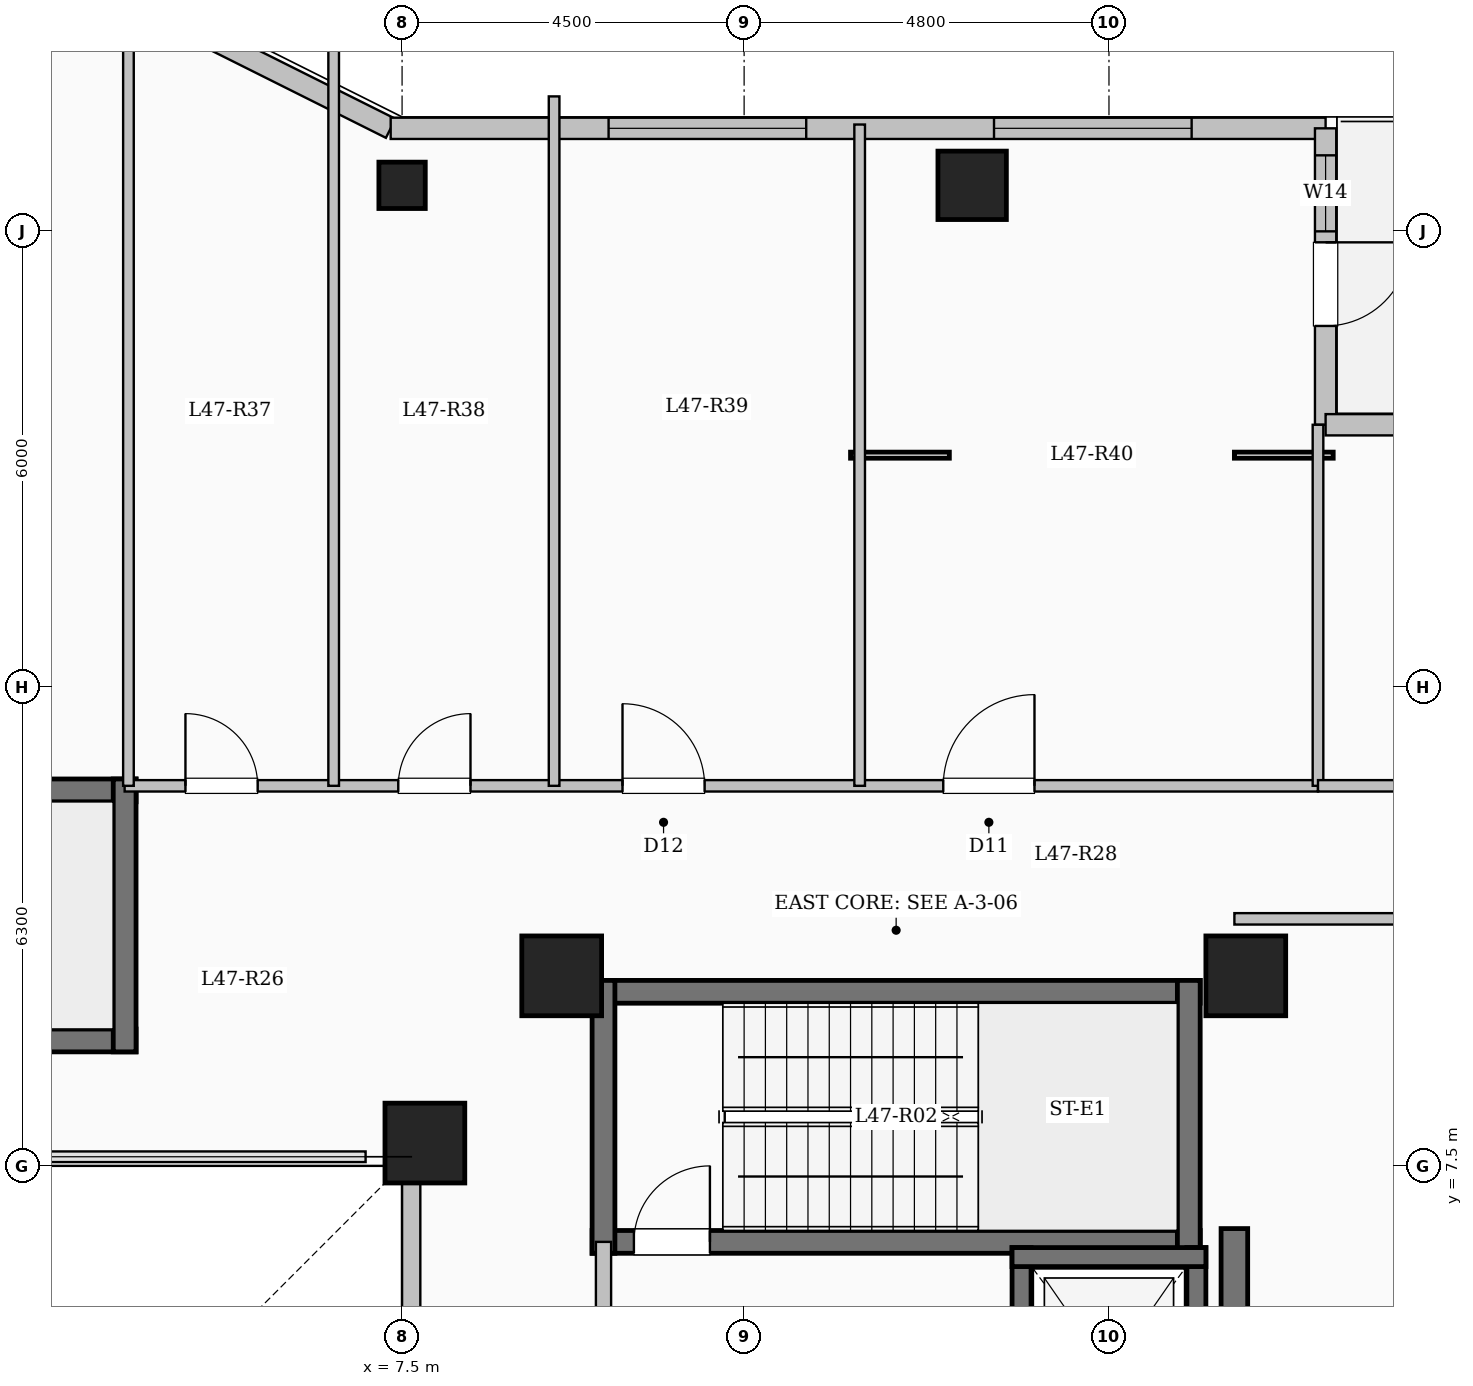
"""IFC4 building model, lengths in metres.
Left out: names, types, materials, properties, quantities, classifications, styles, units other than length and angle.
Written with IfcOpenShell. Run it as: python <this file> out.ifc"""

import sys

from ifc_helpers import new_model, si_unit, direction, frame, frame_2d, origin, origin_2d, place, context, subcontext, project, spatial, rectangle, hollow_circle, extrude, element, fill, save


model = new_model("IFC4")
c1 = context("Model", 3, precision=1e-05, world=origin(), true_north=direction((0.0, 1.0)))
c2 = subcontext(c1, "Body", "Model", "MODEL_VIEW")
j1 = project(units=[si_unit("LENGTHUNIT", "METRE"), si_unit("PLANEANGLEUNIT", "RADIAN")], contexts=[c1])
p1 = place(None, origin())
s1 = spatial("IfcSite", under=j1, at=p1, CompositionType="ELEMENT")
p2 = place(p1, origin())
s2 = spatial("IfcBuilding", under=s1, at=p2, CompositionType="ELEMENT")
p3 = place(p2, frame((0.0, 0.0, 172.8)))
s3 = spatial("IfcBuildingStorey", under=s2, at=p3, CompositionType="ELEMENT", Elevation=172.8)
for number, where, z_axis, x_axis in (
    (1, (7.8, 7.8, 0.0), (0.0, 0.0, 1.0), (1.0, 0.0, 0.0)),
    (2, (9.6, 10.0, 0.0), (0.0, 0.0, 1.0), (1.0, 0.0, 0.0)),
    (3, (18.6, 10.0, 0.0), (0.0, 0.0, 1.0), (1.0, 0.0, 0.0)),
):
    element("IfcColumn", number, at=place(p3, frame(where, z_axis=z_axis, x_axis=x_axis)), inside=s3, PredefinedType="COLUMN", context=c2, shape_type="SweptSolid", body=[
        extrude(rectangle(XDim=1.05, YDim=1.05, at=origin_2d()), origin(), (0.0, 0.0, 1.0), 4.5),
    ])
p4 = place(p3, frame((7.5, 20.4, 0.0), z_axis=(0.0, 0.0, 1.0), x_axis=(1.0, 0.0, 0.0)))
e4 = element("IfcColumn", 4, at=p4, inside=s3, PredefinedType="COLUMN", context=c2, shape_type="SweptSolid", body=[
    extrude(hollow_circle(Radius=0.305, WallThickness=0.025, at=origin_2d()), origin(), (0.0, 0.0, 1.0), 4.5),
])
p5 = place(p3, frame((15.0, 20.4, 0.0), z_axis=(0.0, 0.0, 1.0), x_axis=(1.0, 0.0, 0.0)))
e5 = element("IfcColumn", 5, at=p5, inside=s3, PredefinedType="COLUMN", context=c2, shape_type="SweptSolid", body=[
    extrude(rectangle(XDim=0.9, YDim=0.9, at=origin_2d()), origin(), (0.0, 0.0, 1.0), 4.5),
])
p6 = place(p3, frame((7.62, -7.62, 0.0), z_axis=(0.0, 0.0, 1.0), x_axis=(0.0, 1.0, 0.0)))
e6 = element("IfcWall", 6, at=p6, inside=s3, PredefinedType="SOLIDWALL", context=c2, shape_type="SweptSolid", body=[
    extrude(rectangle(XDim=15.24, YDim=0.24, at=frame_2d((7.62, 0.0))), origin(), (0.0, 0.0, 1.0), 4.2),
])
p7 = place(p6, frame((6.92, 0.0, 0.95)))
e7 = element("IfcOpeningElement", 7, at=p7, cuts=e6, PredefinedType="OPENING", context=c2, shape_type="SweptSolid", body=[
    extrude(rectangle(XDim=1.4, YDim=1.5, at=frame_2d((0.7, 0.75))), frame((0.0, 0.13, 0.0), z_axis=(0.0, -1.0, 0.0), x_axis=(1.0, 0.0, 0.0)), (0.0, 0.0, 1.0), 0.26),
])
p8 = place(p3, frame((4.35, 22.65, 0.0), z_axis=(0.0, 0.0, 1.0), x_axis=(0.894427191, -0.4472135955, 0.0)))
e8 = element("IfcWall", 8, at=p8, inside=s3, PredefinedType="SOLIDWALL", context=c2, shape_type="SweptSolid", body=[
    extrude(rectangle(XDim=3.354, YDim=0.28, at=frame_2d((1.677, 0.0))), origin(), (0.0, 0.0, 1.0), 4.2),
])
p9 = place(p3, frame((7.35, 21.15, 0.0), z_axis=(0.0, 0.0, 1.0), x_axis=(1.0, 0.0, 0.0)))
e9 = element("IfcWall", 9, at=p9, inside=s3, PredefinedType="SOLIDWALL", context=c2, shape_type="SweptSolid", body=[
    extrude(rectangle(XDim=12.3, YDim=0.28, at=frame_2d((6.15, 0.0))), origin(), (0.0, 0.0, 1.0), 4.2),
])
p10 = place(p9, frame((2.867, 0.0, 0.85)))
e10 = element("IfcOpeningElement", 10, at=p10, cuts=e9, PredefinedType="OPENING", context=c2, shape_type="SweptSolid", body=[
    extrude(rectangle(XDim=2.6, YDim=2.4, at=frame_2d((1.3, 1.2))), frame((0.0, 0.15, 0.0), z_axis=(0.0, -1.0, 0.0), x_axis=(1.0, 0.0, 0.0)), (0.0, 0.0, 1.0), 0.3),
])
p11 = place(p9, frame((7.938, 0.0, 0.85)))
e11 = element("IfcOpeningElement", 11, at=p11, cuts=e9, PredefinedType="OPENING", context=c2, shape_type="SweptSolid", body=[
    extrude(rectangle(XDim=2.6, YDim=2.4, at=frame_2d((1.3, 1.2))), frame((0.0, 0.15, 0.0), z_axis=(0.0, -1.0, 0.0), x_axis=(1.0, 0.0, 0.0)), (0.0, 0.0, 1.0), 0.3),
])
p12 = place(p3, frame((19.65, 21.15, 0.0), z_axis=(0.0, 0.0, 1.0), x_axis=(0.0, -1.0, 0.0)))
e12 = element("IfcWall", 12, at=p12, inside=s3, PredefinedType="SOLIDWALL", context=c2, shape_type="SweptSolid", body=[
    extrude(rectangle(XDim=3.9, YDim=0.28, at=frame_2d((1.95, 0.0))), origin(), (0.0, 0.0, 1.0), 4.2),
])
p13 = place(p12, frame((1.5, 0.0, 0.0)))
e13 = element("IfcOpeningElement", 13, at=p13, cuts=e12, PredefinedType="OPENING", context=c2, shape_type="SweptSolid", body=[
    extrude(rectangle(XDim=1.1, YDim=2.2, at=frame_2d((0.55, 1.1))), frame((0.0, 0.15, 0.0), z_axis=(0.0, -1.0, 0.0), x_axis=(1.0, 0.0, 0.0)), (0.0, 0.0, 1.0), 0.3),
])
p14 = place(p12, frame((0.355, 0.0, 0.95)))
e14 = element("IfcOpeningElement", 14, at=p14, cuts=e12, PredefinedType="OPENING", context=c2, shape_type="SweptSolid", body=[
    extrude(rectangle(XDim=1.0, YDim=1.5, at=frame_2d((0.5, 0.75))), frame((0.0, 0.15, 0.0), z_axis=(0.0, -1.0, 0.0), x_axis=(1.0, 0.0, 0.0)), (0.0, 0.0, 1.0), 0.3),
])
p15 = place(p3, frame((19.65, 17.25, 0.0), z_axis=(0.0, 0.0, 1.0), x_axis=(1.0, 0.0, 0.0)))
e15 = element("IfcWall", 15, at=p15, inside=s3, PredefinedType="SOLIDWALL", context=c2, shape_type="SweptSolid", body=[
    extrude(rectangle(XDim=5.4, YDim=0.28, at=frame_2d((2.7, 0.0))), origin(), (0.0, 0.0, 1.0), 4.2),
])
p16 = place(p15, frame((1.375, 0.0, 0.85)))
e16 = element("IfcOpeningElement", 16, at=p16, cuts=e15, PredefinedType="OPENING", context=c2, shape_type="SweptSolid", body=[
    extrude(rectangle(XDim=2.6, YDim=2.4, at=frame_2d((1.3, 1.2))), frame((0.0, 0.15, 0.0), z_axis=(0.0, -1.0, 0.0), x_axis=(1.0, 0.0, 0.0)), (0.0, 0.0, 1.0), 0.3),
])
p17 = place(p3, frame((10.0, 9.79, 0.0), z_axis=(0.0, 0.0, 1.0), x_axis=(1.0, 0.0, 0.0)))
e17 = element("IfcWall", 17, at=p17, inside=s3, PredefinedType="SHEAR", context=c2, shape_type="SweptSolid", body=[
    extrude(rectangle(XDim=8.0, YDim=0.3, at=frame_2d((4.0, 0.0))), origin(), (0.0, 0.0, 1.0), 4.5),
])
p18 = place(p3, frame((10.0, 6.5, 0.0), z_axis=(0.0, 0.0, 1.0), x_axis=(1.0, 0.0, 0.0)))
e18 = element("IfcWall", 18, at=p18, inside=s3, PredefinedType="SHEAR", context=c2, shape_type="SweptSolid", body=[
    extrude(rectangle(XDim=8.0, YDim=0.3, at=frame_2d((4.0, 0.0))), origin(), (0.0, 0.0, 1.0), 4.5),
])
p19 = place(p18, frame((0.55, 0.0, 0.0)))
e19 = element("IfcOpeningElement", 19, at=p19, cuts=e18, PredefinedType="OPENING", context=c2, shape_type="SweptSolid", body=[
    extrude(rectangle(XDim=1.0, YDim=2.15, at=frame_2d((0.5, 1.075))), frame((0.0, 0.16, 0.0), z_axis=(0.0, -1.0, 0.0), x_axis=(1.0, 0.0, 0.0)), (0.0, 0.0, 1.0), 0.32),
])
for number, where, z_axis, x_axis in (
    (20, (10.15, 6.35, 0.0), (0.0, 0.0, 1.0), (0.0, 1.0, 0.0)),
    (21, (17.85, 6.35, 0.0), (0.0, 0.0, 1.0), (0.0, 1.0, 0.0)),
):
    element("IfcWall", number, at=place(p3, frame(where, z_axis=z_axis, x_axis=x_axis)), inside=s3, PredefinedType="SHEAR", context=c2, shape_type="SweptSolid", body=[
        extrude(rectangle(XDim=3.59, YDim=0.3, at=frame_2d((1.795, 0.0))), origin(), (0.0, 0.0, 1.0), 4.5),
    ])
p20 = place(p3, frame((-4.0, 12.44, 0.0), z_axis=(0.0, 0.0, 1.0), x_axis=(1.0, 0.0, 0.0)))
e22 = element("IfcWall", 22, at=p20, inside=s3, PredefinedType="SHEAR", context=c2, shape_type="SweptSolid", body=[
    extrude(rectangle(XDim=8.0, YDim=0.3, at=frame_2d((4.0, 0.0))), origin(), (0.0, 0.0, 1.0), 4.5),
])
p21 = place(p3, frame((-4.0, 9.15, 0.0), z_axis=(0.0, 0.0, 1.0), x_axis=(1.0, 0.0, 0.0)))
e23 = element("IfcWall", 23, at=p21, inside=s3, PredefinedType="SHEAR", context=c2, shape_type="SweptSolid", body=[
    extrude(rectangle(XDim=8.0, YDim=0.3, at=frame_2d((4.0, 0.0))), origin(), (0.0, 0.0, 1.0), 4.5),
])
p22 = place(p21, frame((0.55, 0.0, 0.0)))
e24 = element("IfcOpeningElement", 24, at=p22, cuts=e23, PredefinedType="OPENING", context=c2, shape_type="SweptSolid", body=[
    extrude(rectangle(XDim=1.0, YDim=2.15, at=frame_2d((0.5, 1.075))), frame((0.0, 0.16, 0.0), z_axis=(0.0, -1.0, 0.0), x_axis=(1.0, 0.0, 0.0)), (0.0, 0.0, 1.0), 0.32),
])
p23 = place(p3, frame((3.85, 9.0, 0.0), z_axis=(0.0, 0.0, 1.0), x_axis=(0.0, 1.0, 0.0)))
e25 = element("IfcWall", 25, at=p23, inside=s3, PredefinedType="SHEAR", context=c2, shape_type="SweptSolid", body=[
    extrude(rectangle(XDim=3.59, YDim=0.3, at=frame_2d((1.795, 0.0))), origin(), (0.0, 0.0, 1.0), 4.5),
])
p24 = place(p3, frame((10.15, 3.25, 0.0), z_axis=(0.0, 0.0, 1.0), x_axis=(0.0, 1.0, 0.0)))
e26 = element("IfcWall", 26, at=p24, inside=s3, PredefinedType="SOLIDWALL", context=c2, shape_type="SweptSolid", body=[
    extrude(rectangle(XDim=3.25, YDim=0.2, at=frame_2d((1.625, 0.0))), origin(), (0.0, 0.0, 1.0), 4.2),
])
p25 = place(p24, frame((1.1, 0.0, 0.0)))
e27 = element("IfcOpeningElement", 27, at=p25, cuts=e26, PredefinedType="OPENING", context=c2, shape_type="SweptSolid", body=[
    extrude(rectangle(XDim=1.02, YDim=2.15, at=frame_2d((0.51, 1.075))), frame((0.0, 0.11, 0.0), z_axis=(0.0, -1.0, 0.0), x_axis=(1.0, 0.0, 0.0)), (0.0, 0.0, 1.0), 0.22),
])
p26 = place(p3, frame((15.65, 3.175, 0.0), z_axis=(0.0, 0.0, 1.0), x_axis=(0.0, 1.0, 0.0)))
e28 = element("IfcWall", 28, at=p26, inside=s3, PredefinedType="SHEAR", context=c2, shape_type="SweptSolid", body=[
    extrude(rectangle(XDim=3.25, YDim=0.25, at=frame_2d((1.625, 0.0))), origin(), (0.0, 0.0, 1.0), 4.5),
])
p27 = place(p26, frame((1.075, 0.0, 0.0)))
e29 = element("IfcOpeningElement", 29, at=p27, cuts=e28, PredefinedType="OPENING", context=c2, shape_type="SweptSolid", body=[
    extrude(rectangle(XDim=1.1, YDim=2.15, at=frame_2d((0.55, 1.075))), frame((0.0, 0.135, 0.0), z_axis=(0.0, -1.0, 0.0), x_axis=(1.0, 0.0, 0.0)), (0.0, 0.0, 1.0), 0.27),
])
p28 = place(p3, frame((17.95, 3.175, 0.0), z_axis=(0.0, 0.0, 1.0), x_axis=(0.0, 1.0, 0.0)))
e30 = element("IfcWall", 30, at=p28, inside=s3, PredefinedType="SHEAR", context=c2, shape_type="SweptSolid", body=[
    extrude(rectangle(XDim=3.25, YDim=0.25, at=frame_2d((1.625, 0.0))), origin(), (0.0, 0.0, 1.0), 4.5),
])
p29 = place(p3, frame((15.525, 6.3, 0.0), z_axis=(0.0, 0.0, 1.0), x_axis=(1.0, 0.0, 0.0)))
e31 = element("IfcWall", 31, at=p29, inside=s3, PredefinedType="SHEAR", context=c2, shape_type="SweptSolid", body=[
    extrude(rectangle(XDim=2.55, YDim=0.25, at=frame_2d((1.275, 0.0))), origin(), (0.0, 0.0, 1.0), 4.5),
])
p30 = place(p3, frame((18.45, -7.375, 0.0), z_axis=(0.0, 0.0, 1.0), x_axis=(0.0, 1.0, 0.0)))
e32 = element("IfcWall", 32, at=p30, inside=s3, PredefinedType="SHEAR", context=c2, shape_type="SweptSolid", body=[
    extrude(rectangle(XDim=14.05, YDim=0.35, at=frame_2d((7.025, 0.0))), origin(), (0.0, 0.0, 1.0), 4.5),
])
p31 = place(p3, frame((3.85, 12.5, 0.0), z_axis=(0.0, 0.0, 1.0), x_axis=(1.0, 0.0, 0.0)))
e33 = element("IfcWall", 33, at=p31, inside=s3, PredefinedType="PARTITIONING", context=c2, shape_type="SweptSolid", body=[
    extrude(rectangle(XDim=15.7, YDim=0.15, at=frame_2d((7.85, 0.0))), origin(), (0.0, 0.0, 1.0), 4.2),
])
p32 = place(p31, frame((0.8, 0.0, 0.0)))
e34 = element("IfcOpeningElement", 34, at=p32, cuts=e33, PredefinedType="OPENING", context=c2, shape_type="SweptSolid", body=[
    extrude(rectangle(XDim=0.95, YDim=2.15, at=frame_2d((0.475, 1.075))), frame((0.0, 0.085, 0.0), z_axis=(0.0, -1.0, 0.0), x_axis=(1.0, 0.0, 0.0)), (0.0, 0.0, 1.0), 0.17),
])
p33 = place(p31, frame((3.6, 0.0, 0.0)))
e35 = element("IfcOpeningElement", 35, at=p33, cuts=e33, PredefinedType="OPENING", context=c2, shape_type="SweptSolid", body=[
    extrude(rectangle(XDim=0.95, YDim=2.15, at=frame_2d((0.475, 1.075))), frame((0.0, 0.085, 0.0), z_axis=(0.0, -1.0, 0.0), x_axis=(1.0, 0.0, 0.0)), (0.0, 0.0, 1.0), 0.17),
])
p34 = place(p31, frame((6.55, 0.0, 0.0)))
e36 = element("IfcOpeningElement", 36, at=p34, cuts=e33, PredefinedType="OPENING", context=c2, shape_type="SweptSolid", body=[
    extrude(rectangle(XDim=1.08, YDim=2.15, at=frame_2d((0.54, 1.075))), frame((0.0, 0.085, 0.0), z_axis=(0.0, -1.0, 0.0), x_axis=(1.0, 0.0, 0.0)), (0.0, 0.0, 1.0), 0.17),
])
p35 = place(p31, frame((10.77, 0.0, 0.0)))
e37 = element("IfcOpeningElement", 37, at=p35, cuts=e33, PredefinedType="OPENING", context=c2, shape_type="SweptSolid", body=[
    extrude(rectangle(XDim=1.2, YDim=2.15, at=frame_2d((0.6, 1.075))), frame((0.0, 0.085, 0.0), z_axis=(0.0, -1.0, 0.0), x_axis=(1.0, 0.0, 0.0)), (0.0, 0.0, 1.0), 0.17),
])
p36 = place(p3, frame((3.9, 12.5, 0.0), z_axis=(0.0, 0.0, 1.0), x_axis=(0.0, 1.0, 0.0)))
e38 = element("IfcWall", 38, at=p36, inside=s3, PredefinedType="PARTITIONING", context=c2, shape_type="SweptSolid", body=[
    extrude(rectangle(XDim=10.18, YDim=0.14, at=frame_2d((5.09, 0.0))), origin(), (0.0, 0.0, 1.0), 4.2),
])
p37 = place(p3, frame((6.6, 12.5, 0.0), z_axis=(0.0, 0.0, 1.0), x_axis=(0.0, 1.0, 0.0)))
e39 = element("IfcWall", 39, at=p37, inside=s3, PredefinedType="PARTITIONING", context=c2, shape_type="SweptSolid", body=[
    extrude(rectangle(XDim=9.785, YDim=0.14, at=frame_2d((4.893, 0.0))), origin(), (0.0, 0.0, 1.0), 4.2),
])
p38 = place(p3, frame((9.5, 12.5, 0.0), z_axis=(0.0, 0.0, 1.0), x_axis=(0.0, 1.0, 0.0)))
e40 = element("IfcWall", 40, at=p38, inside=s3, PredefinedType="PARTITIONING", context=c2, shape_type="SweptSolid", body=[
    extrude(rectangle(XDim=9.07, YDim=0.14, at=frame_2d((4.535, 0.0))), origin(), (0.0, 0.0, 1.0), 4.2),
])
p39 = place(p3, frame((13.52, 12.5, 0.0), z_axis=(0.0, 0.0, 1.0), x_axis=(0.0, 1.0, 0.0)))
e41 = element("IfcWall", 41, at=p39, inside=s3, PredefinedType="PARTITIONING", context=c2, shape_type="SweptSolid", body=[
    extrude(rectangle(XDim=8.7, YDim=0.14, at=frame_2d((4.35, 0.0))), origin(), (0.0, 0.0, 1.0), 4.2),
])
p40 = place(p3, frame((18.45, 10.75, 0.0), z_axis=(0.0, 0.0, 1.0), x_axis=(1.0, 0.0, 0.0)))
e42 = element("IfcWall", 42, at=p40, inside=s3, PredefinedType="PARTITIONING", context=c2, shape_type="SweptSolid", body=[
    extrude(rectangle(XDim=6.63, YDim=0.15, at=frame_2d((3.315, 0.0))), origin(), (0.0, 0.0, 1.0), 4.2),
])
p41 = place(p3, frame((19.55, 12.5, 0.0), z_axis=(0.0, 0.0, 1.0), x_axis=(0.0, 1.0, 0.0)))
e43 = element("IfcWall", 43, at=p41, inside=s3, PredefinedType="PARTITIONING", context=c2, shape_type="SweptSolid", body=[
    extrude(rectangle(XDim=4.75, YDim=0.14, at=frame_2d((2.375, 0.0))), origin(), (0.0, 0.0, 1.0), 4.2),
])
p42 = place(p3, frame((19.55, 12.5, 0.0), z_axis=(0.0, 0.0, 1.0), x_axis=(1.0, 0.0, 0.0)))
e44 = element("IfcWall", 44, at=p42, inside=s3, PredefinedType="PARTITIONING", context=c2, shape_type="SweptSolid", body=[
    extrude(rectangle(XDim=5.53, YDim=0.15, at=frame_2d((2.765, 0.0))), origin(), (0.0, 0.0, 1.0), 4.2),
])
p43 = place(p42, frame((2.29, 0.0, 0.0)))
e45 = element("IfcOpeningElement", 45, at=p43, cuts=e44, PredefinedType="OPENING", context=c2, shape_type="SweptSolid", body=[
    extrude(rectangle(XDim=0.95, YDim=2.15, at=frame_2d((0.475, 1.075))), frame((0.0, 0.085, 0.0), z_axis=(0.0, -1.0, 0.0), x_axis=(1.0, 0.0, 0.0)), (0.0, 0.0, 1.0), 0.17),
])
p44 = place(p10, origin())
e46 = element("IfcWindow", 46, at=p44, inside=s3, PartitioningType="SINGLE_PANEL", PredefinedType="WINDOW", context=c2, shape_type="SweptSolid", body=[
    extrude(rectangle(XDim=2.6, YDim=2.4, at=frame_2d((1.3, 1.2))), frame((0.0, 0.03, 0.0), z_axis=(0.0, -1.0, 0.0), x_axis=(1.0, 0.0, 0.0)), (0.0, 0.0, 1.0), 0.06),
])
fill(e10, e46)
p45 = place(p11, origin())
e47 = element("IfcWindow", 47, at=p45, inside=s3, PartitioningType="SINGLE_PANEL", PredefinedType="WINDOW", context=c2, shape_type="SweptSolid", body=[
    extrude(rectangle(XDim=2.6, YDim=2.4, at=frame_2d((1.3, 1.2))), frame((0.0, 0.03, 0.0), z_axis=(0.0, -1.0, 0.0), x_axis=(1.0, 0.0, 0.0)), (0.0, 0.0, 1.0), 0.06),
])
fill(e11, e47)
p46 = place(p13, origin())
e48 = element("IfcDoor", 48, at=p46, inside=s3, OperationType="SINGLE_SWING_LEFT", PredefinedType="DOOR", context=c2, shape_type="SweptSolid", body=[
    extrude(rectangle(XDim=1.1, YDim=2.2, at=frame_2d((0.55, 1.1))), frame((0.0, 0.025, 0.0), z_axis=(0.0, -1.0, 0.0), x_axis=(1.0, 0.0, 0.0)), (0.0, 0.0, 1.0), 0.05),
])
fill(e13, e48)
p47 = place(p14, origin())
e49 = element("IfcWindow", 49, at=p47, inside=s3, PartitioningType="SINGLE_PANEL", PredefinedType="WINDOW", context=c2, shape_type="SweptSolid", body=[
    extrude(rectangle(XDim=1.0, YDim=1.5, at=frame_2d((0.5, 0.75))), frame((0.0, 0.03, 0.0), z_axis=(0.0, -1.0, 0.0), x_axis=(1.0, 0.0, 0.0)), (0.0, 0.0, 1.0), 0.06),
])
fill(e14, e49)
p48 = place(p19, origin())
e50 = element("IfcDoor", 50, at=p48, inside=s3, OperationType="SINGLE_SWING_RIGHT", PredefinedType="DOOR", context=c2, shape_type="SweptSolid", body=[
    extrude(rectangle(XDim=1.0, YDim=2.15, at=frame_2d((0.5, 1.075))), frame((0.0, 0.025, 0.0), z_axis=(0.0, -1.0, 0.0), x_axis=(1.0, 0.0, 0.0)), (0.0, 0.0, 1.0), 0.05),
])
fill(e19, e50)
p49 = place(p32, origin())
e51 = element("IfcDoor", 51, at=p49, inside=s3, OperationType="SINGLE_SWING_LEFT", PredefinedType="DOOR", context=c2, shape_type="SweptSolid", body=[
    extrude(rectangle(XDim=0.95, YDim=2.15, at=frame_2d((0.475, 1.075))), frame((0.0, 0.025, 0.0), z_axis=(0.0, -1.0, 0.0), x_axis=(1.0, 0.0, 0.0)), (0.0, 0.0, 1.0), 0.05),
])
fill(e34, e51)
p50 = place(p33, origin())
e52 = element("IfcDoor", 52, at=p50, inside=s3, OperationType="SINGLE_SWING_RIGHT", PredefinedType="DOOR", context=c2, shape_type="SweptSolid", body=[
    extrude(rectangle(XDim=0.95, YDim=2.15, at=frame_2d((0.475, 1.075))), frame((0.0, 0.025, 0.0), z_axis=(0.0, -1.0, 0.0), x_axis=(1.0, 0.0, 0.0)), (0.0, 0.0, 1.0), 0.05),
])
fill(e35, e52)
p51 = place(p34, origin())
e53 = element("IfcDoor", 53, at=p51, inside=s3, OperationType="SINGLE_SWING_LEFT", PredefinedType="DOOR", context=c2, shape_type="SweptSolid", body=[
    extrude(rectangle(XDim=1.08, YDim=2.15, at=frame_2d((0.54, 1.075))), frame((0.0, 0.025, 0.0), z_axis=(0.0, -1.0, 0.0), x_axis=(1.0, 0.0, 0.0)), (0.0, 0.0, 1.0), 0.05),
])
fill(e36, e53)
p52 = place(p35, origin())
e54 = element("IfcDoor", 54, at=p52, inside=s3, OperationType="SINGLE_SWING_RIGHT", PredefinedType="DOOR", context=c2, shape_type="SweptSolid", body=[
    extrude(rectangle(XDim=1.2, YDim=2.15, at=frame_2d((0.6, 1.075))), frame((0.0, 0.025, 0.0), z_axis=(0.0, -1.0, 0.0), x_axis=(1.0, 0.0, 0.0)), (0.0, 0.0, 1.0), 0.05),
])
fill(e37, e54)
save(model, sys.argv[1])
